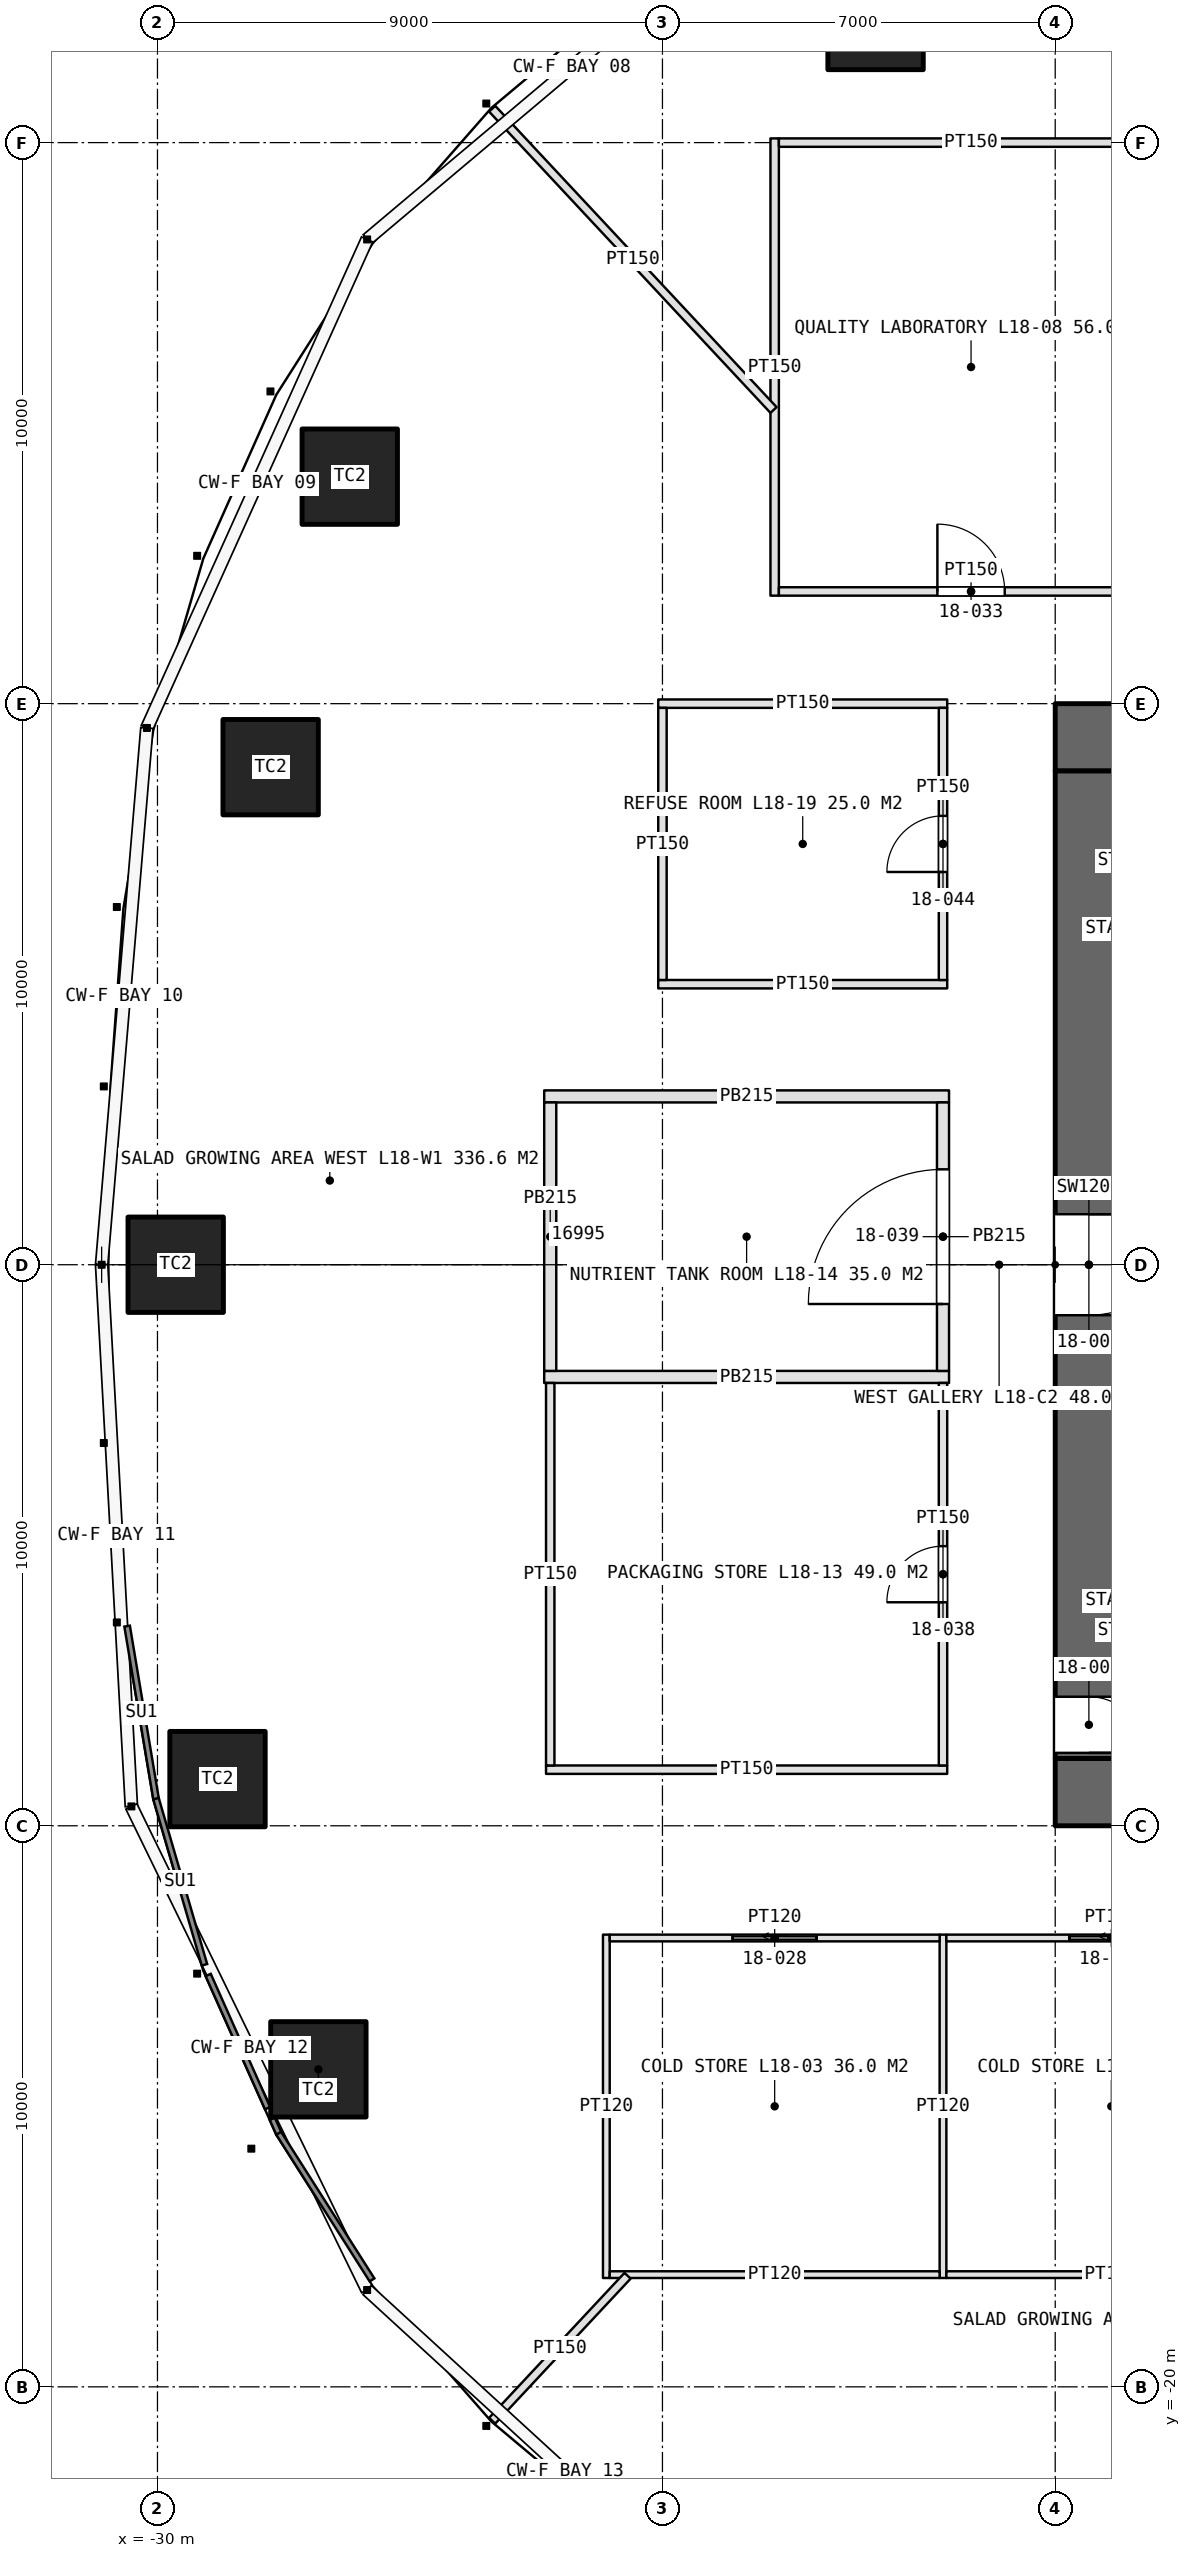
"""IFC4 building model, lengths in metres.
Left out: names, types, materials, properties, quantities, classifications, styles, units other than length and angle.
Written with IfcOpenShell. Run it as: python <this file> out.ifc"""

import sys

from ifc_helpers import new_model, si_unit, direction, frame, frame_2d, origin, origin_2d, place, context, subcontext, project, spatial, rectangle, extrude, element, fill, save


model = new_model("IFC4")
c1 = context("Model", 3, precision=1e-05, world=origin(), true_north=direction((0.0, 1.0)))
c2 = subcontext(c1, "Body", "Model", "MODEL_VIEW")
j1 = project(units=[si_unit("LENGTHUNIT", "METRE"), si_unit("PLANEANGLEUNIT", "RADIAN")], contexts=[c1])
p1 = place(None, origin())
s1 = spatial("IfcSite", under=j1, at=p1, CompositionType="ELEMENT")
p2 = place(p1, origin())
s2 = spatial("IfcBuilding", under=s1, at=p2, CompositionType="ELEMENT")
p3 = place(p2, frame((0.0, 0.0, 90.0)))
s3 = spatial("IfcBuildingStorey", under=s2, at=p3, CompositionType="ELEMENT", Elevation=90.0)
p4 = place(p3, frame((-14.0, -9.4, 0.0), z_axis=(0.0, 0.0, 1.0), x_axis=(1.0, 0.0, 0.0)))
e1 = element("IfcWall", 1, at=p4, inside=s3, PredefinedType="SHEAR", context=c2, shape_type="SweptSolid", body=[
    extrude(rectangle(XDim=28.0, YDim=1.2, at=frame_2d((14.0, 0.0))), origin(), (0.0, 0.0, 1.0), 5.0),
])
p5 = place(p4, frame((13.1, 0.0, 0.0)))
e2 = element("IfcOpeningElement", 2, at=p5, cuts=e1, PredefinedType="OPENING", context=c2, shape_type="SweptSolid", body=[
    extrude(rectangle(XDim=1.8, YDim=2.4, at=frame_2d((0.9, 1.2))), frame((0.0, 0.61, 0.0), z_axis=(0.0, -1.0, 0.0), x_axis=(1.0, 0.0, 0.0)), (0.0, 0.0, 1.0), 1.22),
])
p6 = place(p4, frame((22.9, 0.0, 0.0)))
e3 = element("IfcOpeningElement", 3, at=p6, cuts=e1, PredefinedType="OPENING", context=c2, shape_type="SweptSolid", body=[
    extrude(rectangle(XDim=2.2, YDim=2.7, at=frame_2d((1.1, 1.35))), frame((0.0, 0.61, 0.0), z_axis=(0.0, -1.0, 0.0), x_axis=(1.0, 0.0, 0.0)), (0.0, 0.0, 1.0), 1.22),
])
p7 = place(p3, frame((14.0, 9.4, 0.0), z_axis=(0.0, 0.0, 1.0), x_axis=(-1.0, 0.0, 0.0)))
e4 = element("IfcWall", 4, at=p7, inside=s3, PredefinedType="SHEAR", context=c2, shape_type="SweptSolid", body=[
    extrude(rectangle(XDim=28.0, YDim=1.2, at=frame_2d((14.0, 0.0))), origin(), (0.0, 0.0, 1.0), 5.0),
])
p8 = place(p7, frame((24.0, 0.0, 0.0)))
e5 = element("IfcOpeningElement", 5, at=p8, cuts=e4, PredefinedType="OPENING", context=c2, shape_type="SweptSolid", body=[
    extrude(rectangle(XDim=1.0, YDim=2.4, at=frame_2d((0.5, 1.2))), frame((0.0, 0.61, 0.0), z_axis=(0.0, -1.0, 0.0), x_axis=(1.0, 0.0, 0.0)), (0.0, 0.0, 1.0), 1.22),
])
p9 = place(p7, frame((13.1, 0.0, 0.0)))
e6 = element("IfcOpeningElement", 6, at=p9, cuts=e4, PredefinedType="OPENING", context=c2, shape_type="SweptSolid", body=[
    extrude(rectangle(XDim=1.8, YDim=2.4, at=frame_2d((0.9, 1.2))), frame((0.0, 0.61, 0.0), z_axis=(0.0, -1.0, 0.0), x_axis=(1.0, 0.0, 0.0)), (0.0, 0.0, 1.0), 1.22),
])
p10 = place(p3, frame((-13.4, 8.8, 0.0), z_axis=(0.0, 0.0, 1.0), x_axis=(0.0, -1.0, 0.0)))
e7 = element("IfcWall", 7, at=p10, inside=s3, PredefinedType="SHEAR", context=c2, shape_type="SweptSolid", body=[
    extrude(rectangle(XDim=17.6, YDim=1.2, at=frame_2d((8.8, 0.0))), origin(), (0.0, 0.0, 1.0), 5.0),
])
p11 = place(p10, frame((7.9, 0.0, 0.0)))
e8 = element("IfcOpeningElement", 8, at=p11, cuts=e7, PredefinedType="OPENING", context=c2, shape_type="SweptSolid", body=[
    extrude(rectangle(XDim=1.8, YDim=2.4, at=frame_2d((0.9, 1.2))), frame((0.0, 0.61, 0.0), z_axis=(0.0, -1.0, 0.0), x_axis=(1.0, 0.0, 0.0)), (0.0, 0.0, 1.0), 1.22),
])
p12 = place(p10, frame((16.5, 0.0, 0.0)))
e9 = element("IfcOpeningElement", 9, at=p12, cuts=e7, PredefinedType="OPENING", context=c2, shape_type="SweptSolid", body=[
    extrude(rectangle(XDim=1.0, YDim=2.4, at=frame_2d((0.5, 1.2))), frame((0.0, 0.61, 0.0), z_axis=(0.0, -1.0, 0.0), x_axis=(1.0, 0.0, 0.0)), (0.0, 0.0, 1.0), 1.22),
])
for number, where, z_axis, x_axis in (
    (10, (-17.202, 22.15, 0.0), (0.0, 0.0, 1.0), (1.0, 0.0, 0.0)),
    (11, (-26.573, 14.046, 0.0), (0.0, 0.0, 1.0), (1.0, 0.0, 0.0)),
    (12, (-27.983, 8.868, 0.0), (0.0, 0.0, 1.0), (1.0, 0.0, 0.0)),
    (13, (-29.675, 0.0, 0.0), (0.0, 0.0, 1.0), (1.0, 0.0, 0.0)),
    (14, (-28.93, -9.168, 0.0), (0.0, 0.0, 1.0), (1.0, 0.0, 0.0)),
    (15, (-27.132, -14.341, 0.0), (0.0, 0.0, 1.0), (1.0, 0.0, 0.0)),
):
    element("IfcColumn", number, at=place(p3, frame(where, z_axis=z_axis, x_axis=x_axis)), inside=s3, PredefinedType="COLUMN", context=c2, shape_type="SweptSolid", body=[
        extrude(rectangle(XDim=1.7, YDim=1.7, at=origin_2d()), origin(), (0.0, 0.0, 1.0), 5.0),
    ])
for number, where, z_axis, x_axis in (
    (16, (-22.0, -11.94, 0.0), (0.0, 0.0, 1.0), (0.0, -1.0, 0.0)),
    (17, (-16.0, -11.94, 0.0), (0.0, 0.0, 1.0), (0.0, -1.0, 0.0)),
):
    element("IfcWall", number, at=place(p3, frame(where, z_axis=z_axis, x_axis=x_axis)), inside=s3, PredefinedType="PARTITIONING", context=c2, shape_type="SweptSolid", body=[
        extrude(rectangle(XDim=6.12, YDim=0.12, at=frame_2d((3.06, 0.0))), origin(), (0.0, 0.0, 1.0), 3.6),
    ])
p13 = place(p3, frame((-21.94, -12.0, 0.0), z_axis=(0.0, 0.0, 1.0), x_axis=(1.0, 0.0, 0.0)))
e18 = element("IfcWall", 18, at=p13, inside=s3, PredefinedType="PARTITIONING", context=c2, shape_type="SweptSolid", body=[
    extrude(rectangle(XDim=5.88, YDim=0.12, at=frame_2d((2.94, 0.0))), origin(), (0.0, 0.0, 1.0), 3.6),
])
p14 = place(p13, frame((2.19, 0.0, 0.0)))
e19 = element("IfcOpeningElement", 19, at=p14, cuts=e18, PredefinedType="OPENING", context=c2, shape_type="SweptSolid", body=[
    extrude(rectangle(XDim=1.5, YDim=2.5, at=frame_2d((0.75, 1.25))), frame((0.0, 0.07, 0.0), z_axis=(0.0, -1.0, 0.0), x_axis=(1.0, 0.0, 0.0)), (0.0, 0.0, 1.0), 0.14),
])
p15 = place(p3, frame((-21.94, -18.0, 0.0), z_axis=(0.0, 0.0, 1.0), x_axis=(1.0, 0.0, 0.0)))
e20 = element("IfcWall", 20, at=p15, inside=s3, PredefinedType="PARTITIONING", context=c2, shape_type="SweptSolid", body=[
    extrude(rectangle(XDim=5.88, YDim=0.12, at=frame_2d((2.94, 0.0))), origin(), (0.0, 0.0, 1.0), 3.6),
])
p16 = place(p3, frame((-15.94, -12.0, 0.0), z_axis=(0.0, 0.0, 1.0), x_axis=(1.0, 0.0, 0.0)))
e21 = element("IfcWall", 21, at=p16, inside=s3, PredefinedType="PARTITIONING", context=c2, shape_type="SweptSolid", body=[
    extrude(rectangle(XDim=5.88, YDim=0.12, at=frame_2d((2.94, 0.0))), origin(), (0.0, 0.0, 1.0), 3.6),
])
p17 = place(p16, frame((2.19, 0.0, 0.0)))
e22 = element("IfcOpeningElement", 22, at=p17, cuts=e21, PredefinedType="OPENING", context=c2, shape_type="SweptSolid", body=[
    extrude(rectangle(XDim=1.5, YDim=2.5, at=frame_2d((0.75, 1.25))), frame((0.0, 0.07, 0.0), z_axis=(0.0, -1.0, 0.0), x_axis=(1.0, 0.0, 0.0)), (0.0, 0.0, 1.0), 0.14),
])
p18 = place(p3, frame((-15.94, -18.0, 0.0), z_axis=(0.0, 0.0, 1.0), x_axis=(1.0, 0.0, 0.0)))
e23 = element("IfcWall", 23, at=p18, inside=s3, PredefinedType="PARTITIONING", context=c2, shape_type="SweptSolid", body=[
    extrude(rectangle(XDim=5.88, YDim=0.12, at=frame_2d((2.94, 0.0))), origin(), (0.0, 0.0, 1.0), 3.6),
])
p19 = place(p3, frame((-19.0, 11.925, 0.0), z_axis=(0.0, 0.0, 1.0), x_axis=(0.0, 1.0, 0.0)))
e24 = element("IfcWall", 24, at=p19, inside=s3, PredefinedType="PARTITIONING", context=c2, shape_type="SweptSolid", body=[
    extrude(rectangle(XDim=8.15, YDim=0.15, at=frame_2d((4.075, 0.0))), origin(), (0.0, 0.0, 1.0), 3.6),
])
p20 = place(p3, frame((-18.925, 12.0, 0.0), z_axis=(0.0, 0.0, 1.0), x_axis=(1.0, 0.0, 0.0)))
e25 = element("IfcWall", 25, at=p20, inside=s3, PredefinedType="PARTITIONING", context=c2, shape_type="SweptSolid", body=[
    extrude(rectangle(XDim=6.85, YDim=0.15, at=frame_2d((3.425, 0.0))), origin(), (0.0, 0.0, 1.0), 3.6),
])
p21 = place(p20, frame((2.825, 0.0, 0.0)))
e26 = element("IfcOpeningElement", 26, at=p21, cuts=e25, PredefinedType="OPENING", context=c2, shape_type="SweptSolid", body=[
    extrude(rectangle(XDim=1.2, YDim=2.3, at=frame_2d((0.6, 1.15))), frame((0.0, 0.085, 0.0), z_axis=(0.0, -1.0, 0.0), x_axis=(1.0, 0.0, 0.0)), (0.0, 0.0, 1.0), 0.17),
])
p22 = place(p3, frame((-18.925, 20.0, 0.0), z_axis=(0.0, 0.0, 1.0), x_axis=(1.0, 0.0, 0.0)))
e27 = element("IfcWall", 27, at=p22, inside=s3, PredefinedType="PARTITIONING", context=c2, shape_type="SweptSolid", body=[
    extrude(rectangle(XDim=6.85, YDim=0.15, at=frame_2d((3.425, 0.0))), origin(), (0.0, 0.0, 1.0), 3.6),
])
p23 = place(p3, frame((-15.925, -9.0, 0.0), z_axis=(0.0, 0.0, 1.0), x_axis=(-1.0, 0.0, 0.0)))
e28 = element("IfcWall", 28, at=p23, inside=s3, PredefinedType="PARTITIONING", context=c2, shape_type="SweptSolid", body=[
    extrude(rectangle(XDim=7.15, YDim=0.15, at=frame_2d((3.575, 0.0))), origin(), (0.0, 0.0, 1.0), 3.6),
])
for number, where, z_axis, x_axis in (
    (29, (-15.893, -2.0, 0.0), (0.0, 0.0, 1.0), (-1.0, 0.0, 0.0)),
    (30, (-15.893, 3.0, 0.0), (0.0, 0.0, 1.0), (-1.0, 0.0, 0.0)),
):
    element("IfcWall", number, at=place(p3, frame(where, z_axis=z_axis, x_axis=x_axis)), inside=s3, PredefinedType="PARTITIONING", context=c2, shape_type="SweptSolid", body=[
        extrude(rectangle(XDim=7.215, YDim=0.215, at=frame_2d((3.607, 0.0))), origin(), (0.0, 0.0, 1.0), 3.6),
    ])
p24 = place(p3, frame((-16.0, -8.925, 0.0), z_axis=(0.0, 0.0, 1.0), x_axis=(0.0, 1.0, 0.0)))
e31 = element("IfcWall", 31, at=p24, inside=s3, PredefinedType="PARTITIONING", context=c2, shape_type="SweptSolid", body=[
    extrude(rectangle(XDim=6.818, YDim=0.15, at=frame_2d((3.409, 0.0))), origin(), (0.0, 0.0, 1.0), 3.6),
])
p25 = place(p24, frame((2.909, 0.0, 0.0)))
e32 = element("IfcOpeningElement", 32, at=p25, cuts=e31, PredefinedType="OPENING", context=c2, shape_type="SweptSolid", body=[
    extrude(rectangle(XDim=1.0, YDim=2.2, at=frame_2d((0.5, 1.1))), frame((0.0, 0.085, 0.0), z_axis=(0.0, -1.0, 0.0), x_axis=(1.0, 0.0, 0.0)), (0.0, 0.0, 1.0), 0.17),
])
p26 = place(p3, frame((-23.0, -8.925, 0.0), z_axis=(0.0, 0.0, 1.0), x_axis=(0.0, 1.0, 0.0)))
e33 = element("IfcWall", 33, at=p26, inside=s3, PredefinedType="PARTITIONING", context=c2, shape_type="SweptSolid", body=[
    extrude(rectangle(XDim=6.818, YDim=0.15, at=frame_2d((3.409, 0.0))), origin(), (0.0, 0.0, 1.0), 3.6),
])
p27 = place(p3, frame((-16.0, -1.893, 0.0), z_axis=(0.0, 0.0, 1.0), x_axis=(0.0, 1.0, 0.0)))
e34 = element("IfcWall", 34, at=p27, inside=s3, PredefinedType="PARTITIONING", context=c2, shape_type="SweptSolid", body=[
    extrude(rectangle(XDim=4.785, YDim=0.215, at=frame_2d((2.393, 0.0))), origin(), (0.0, 0.0, 1.0), 3.6),
])
p28 = place(p27, frame((1.192, 0.0, 0.0)))
e35 = element("IfcOpeningElement", 35, at=p28, cuts=e34, PredefinedType="OPENING", context=c2, shape_type="SweptSolid", body=[
    extrude(rectangle(XDim=2.4, YDim=2.4, at=frame_2d((1.2, 1.2))), frame((0.0, 0.118, 0.0), z_axis=(0.0, -1.0, 0.0), x_axis=(1.0, 0.0, 0.0)), (0.0, 0.0, 1.0), 0.235),
])
p29 = place(p3, frame((-23.0, -1.893, 0.0), z_axis=(0.0, 0.0, 1.0), x_axis=(0.0, 1.0, 0.0)))
e36 = element("IfcWall", 36, at=p29, inside=s3, PredefinedType="PARTITIONING", context=c2, shape_type="SweptSolid", body=[
    extrude(rectangle(XDim=4.785, YDim=0.215, at=frame_2d((2.393, 0.0))), origin(), (0.0, 0.0, 1.0), 3.6),
])
for number, where, z_axis, x_axis in (
    (37, (-15.925, 5.0, 0.0), (0.0, 0.0, 1.0), (-1.0, 0.0, 0.0)),
    (38, (-15.925, 10.0, 0.0), (0.0, 0.0, 1.0), (-1.0, 0.0, 0.0)),
):
    element("IfcWall", number, at=place(p3, frame(where, z_axis=z_axis, x_axis=x_axis)), inside=s3, PredefinedType="PARTITIONING", context=c2, shape_type="SweptSolid", body=[
        extrude(rectangle(XDim=5.15, YDim=0.15, at=frame_2d((2.575, 0.0))), origin(), (0.0, 0.0, 1.0), 3.6),
    ])
p30 = place(p3, frame((-16.0, 5.075, 0.0), z_axis=(0.0, 0.0, 1.0), x_axis=(0.0, 1.0, 0.0)))
e39 = element("IfcWall", 39, at=p30, inside=s3, PredefinedType="PARTITIONING", context=c2, shape_type="SweptSolid", body=[
    extrude(rectangle(XDim=4.85, YDim=0.15, at=frame_2d((2.425, 0.0))), origin(), (0.0, 0.0, 1.0), 3.6),
])
p31 = place(p30, frame((1.925, 0.0, 0.0)))
e40 = element("IfcOpeningElement", 40, at=p31, cuts=e39, PredefinedType="OPENING", context=c2, shape_type="SweptSolid", body=[
    extrude(rectangle(XDim=1.0, YDim=2.2, at=frame_2d((0.5, 1.1))), frame((0.0, 0.085, 0.0), z_axis=(0.0, -1.0, 0.0), x_axis=(1.0, 0.0, 0.0)), (0.0, 0.0, 1.0), 0.17),
])
p32 = place(p3, frame((-21.0, 5.075, 0.0), z_axis=(0.0, 0.0, 1.0), x_axis=(0.0, 1.0, 0.0)))
e41 = element("IfcWall", 41, at=p32, inside=s3, PredefinedType="PARTITIONING", context=c2, shape_type="SweptSolid", body=[
    extrude(rectangle(XDim=4.85, YDim=0.15, at=frame_2d((2.425, 0.0))), origin(), (0.0, 0.0, 1.0), 3.6),
])
p33 = place(p3, frame((-21.622, -18.02, 0.0), z_axis=(0.0, 0.0, 1.0), x_axis=(-0.682522451791, -0.730864626864, 0.0)))
e42 = element("IfcWall", 42, at=p33, inside=s3, PredefinedType="PARTITIONING", context=c2, shape_type="SweptSolid", body=[
    extrude(rectangle(XDim=3.535, YDim=0.15, at=frame_2d((1.768, 0.0))), origin(), (0.0, 0.0, 1.0), 3.6),
])
p34 = place(p3, frame((-19.02, 15.234, 0.0), z_axis=(0.0, 0.0, 1.0), x_axis=(-0.682519491562, 0.730867391281, 0.0)))
e43 = element("IfcWall", 43, at=p34, inside=s3, PredefinedType="PARTITIONING", context=c2, shape_type="SweptSolid", body=[
    extrude(rectangle(XDim=7.347, YDim=0.15, at=frame_2d((3.674, 0.0))), origin(), (0.0, 0.0, 1.0), 3.6),
])
p35 = place(p11, origin())
e44 = element("IfcDoor", 44, at=p35, inside=s3, OperationType="DOUBLE_DOOR_SINGLE_SWING", PredefinedType="DOOR", context=c2, shape_type="SweptSolid", body=[
    extrude(rectangle(XDim=1.8, YDim=2.4, at=frame_2d((0.9, 1.2))), frame((0.0, 0.025, 0.0), z_axis=(0.0, -1.0, 0.0), x_axis=(1.0, 0.0, 0.0)), (0.0, 0.0, 1.0), 0.05),
])
fill(e8, e44)
p36 = place(p12, origin())
e45 = element("IfcDoor", 45, at=p36, inside=s3, OperationType="SINGLE_SWING_RIGHT", PredefinedType="DOOR", context=c2, shape_type="SweptSolid", body=[
    extrude(rectangle(XDim=1.0, YDim=2.4, at=frame_2d((0.5, 1.2))), frame((0.0, 0.025, 0.0), z_axis=(0.0, -1.0, 0.0), x_axis=(1.0, 0.0, 0.0)), (0.0, 0.0, 1.0), 0.05),
])
fill(e9, e45)
p37 = place(p14, origin())
e46 = element("IfcDoor", 46, at=p37, inside=s3, OperationType="SLIDING_TO_LEFT", PredefinedType="DOOR", context=c2, shape_type="SweptSolid", body=[
    extrude(rectangle(XDim=1.5, YDim=2.5, at=frame_2d((0.75, 1.25))), frame((0.0, 0.025, 0.0), z_axis=(0.0, -1.0, 0.0), x_axis=(1.0, 0.0, 0.0)), (0.0, 0.0, 1.0), 0.05),
])
fill(e19, e46)
p38 = place(p17, origin())
e47 = element("IfcDoor", 47, at=p38, inside=s3, OperationType="SLIDING_TO_LEFT", PredefinedType="DOOR", context=c2, shape_type="SweptSolid", body=[
    extrude(rectangle(XDim=1.5, YDim=2.5, at=frame_2d((0.75, 1.25))), frame((0.0, 0.025, 0.0), z_axis=(0.0, -1.0, 0.0), x_axis=(1.0, 0.0, 0.0)), (0.0, 0.0, 1.0), 0.05),
])
fill(e22, e47)
p39 = place(p21, origin())
e48 = element("IfcDoor", 48, at=p39, inside=s3, OperationType="SINGLE_SWING_LEFT", PredefinedType="DOOR", context=c2, shape_type="SweptSolid", body=[
    extrude(rectangle(XDim=1.2, YDim=2.3, at=frame_2d((0.6, 1.15))), frame((0.0, 0.025, 0.0), z_axis=(0.0, -1.0, 0.0), x_axis=(1.0, 0.0, 0.0)), (0.0, 0.0, 1.0), 0.05),
])
fill(e26, e48)
p40 = place(p25, origin())
e49 = element("IfcDoor", 49, at=p40, inside=s3, OperationType="SINGLE_SWING_LEFT", PredefinedType="DOOR", context=c2, shape_type="SweptSolid", body=[
    extrude(rectangle(XDim=1.0, YDim=2.2, at=frame_2d((0.5, 1.1))), frame((0.0, 0.025, 0.0), z_axis=(0.0, -1.0, 0.0), x_axis=(1.0, 0.0, 0.0)), (0.0, 0.0, 1.0), 0.05),
])
fill(e32, e49)
p41 = place(p28, origin())
e50 = element("IfcDoor", 50, at=p41, inside=s3, OperationType="DOUBLE_DOOR_SINGLE_SWING", PredefinedType="DOOR", context=c2, shape_type="SweptSolid", body=[
    extrude(rectangle(XDim=2.4, YDim=2.4, at=frame_2d((1.2, 1.2))), frame((0.0, 0.025, 0.0), z_axis=(0.0, -1.0, 0.0), x_axis=(1.0, 0.0, 0.0)), (0.0, 0.0, 1.0), 0.05),
])
fill(e35, e50)
p42 = place(p31, origin())
e51 = element("IfcDoor", 51, at=p42, inside=s3, OperationType="SINGLE_SWING_LEFT", PredefinedType="DOOR", context=c2, shape_type="SweptSolid", body=[
    extrude(rectangle(XDim=1.0, YDim=2.2, at=frame_2d((0.5, 1.1))), frame((0.0, 0.025, 0.0), z_axis=(0.0, -1.0, 0.0), x_axis=(1.0, 0.0, 0.0)), (0.0, 0.0, 1.0), 0.05),
])
fill(e40, e51)
save(model, sys.argv[1])
